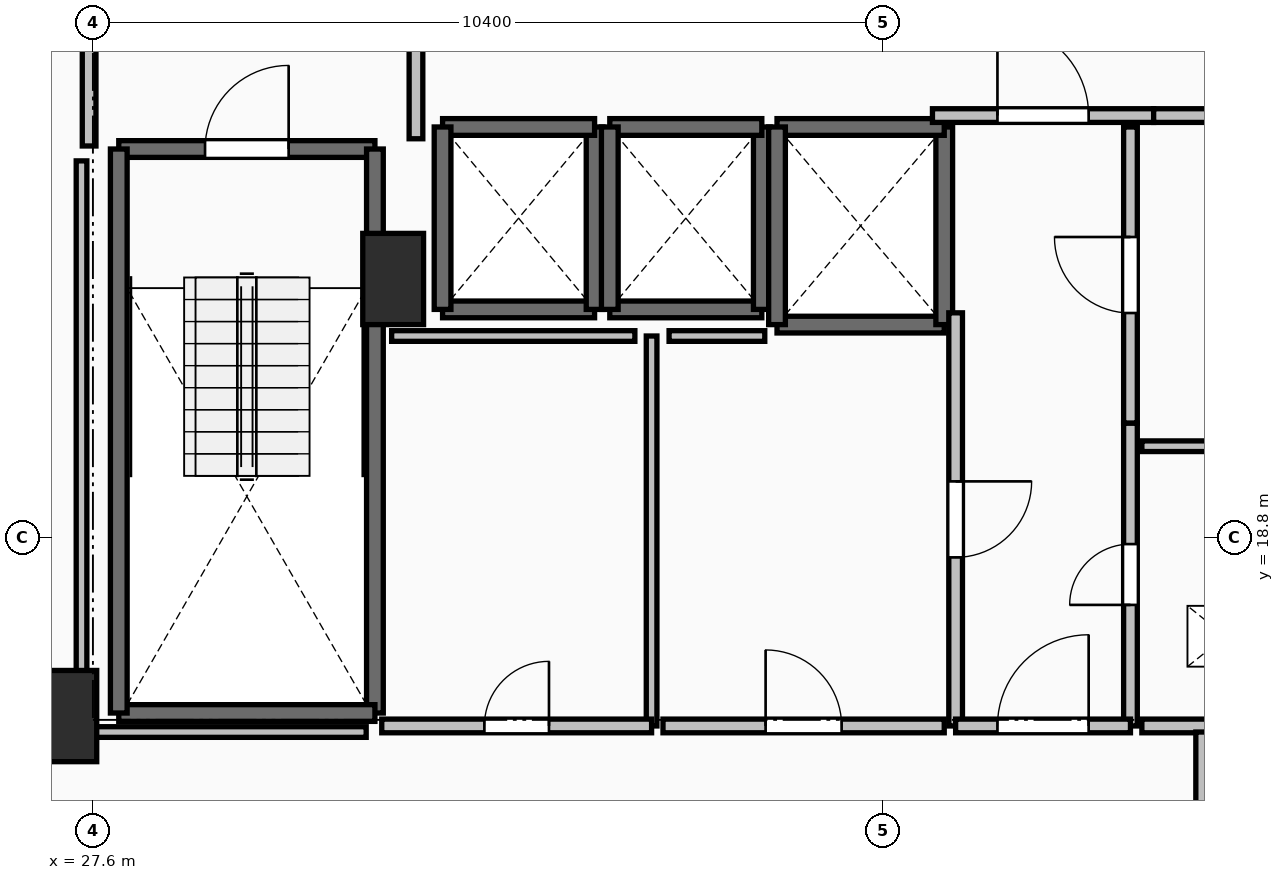
"""IFC4 building model, lengths in metres.
Left out: names, types, materials, properties, quantities, classifications, styles, units other than length and angle.
Written with IfcOpenShell. Run it as: python <this file> out.ifc"""

import sys

from ifc_helpers import new_model, si_unit, direction, frame, frame_2d, origin, origin_2d, place, context, subcontext, project, spatial, rectangle, extrude, element, fill, save


model = new_model("IFC4")
c1 = context("Model", 3, precision=1e-05, world=origin(), true_north=direction((0.0, 1.0)))
c2 = subcontext(c1, "Body", "Model", "MODEL_VIEW")
j1 = project(units=[si_unit("LENGTHUNIT", "METRE"), si_unit("PLANEANGLEUNIT", "RADIAN")], contexts=[c1])
p1 = place(None, origin())
s1 = spatial("IfcSite", under=j1, at=p1, CompositionType="ELEMENT")
p2 = place(p1, origin())
s2 = spatial("IfcBuilding", under=s1, at=p2, CompositionType="ELEMENT")
p3 = place(p2, frame((0.0, 0.0, 41.5)))
s3 = spatial("IfcBuildingStorey", under=s2, at=p3, CompositionType="ELEMENT", Elevation=41.5)
for number, where, z_axis, x_axis in (
    (1, (27.25, 16.45, 0.0), (0.0, 0.0, 1.0), (1.0, 0.0, 0.0)),
    (2, (31.55, 22.2, 0.0), (0.0, 0.0, 1.0), (1.0, 0.0, 0.0)),
):
    element("IfcColumn", number, at=place(p3, frame(where, z_axis=z_axis, x_axis=x_axis)), inside=s3, PredefinedType="PILASTER", context=c2, shape_type="SweptSolid", body=[
        extrude(rectangle(XDim=0.8, YDim=1.2, at=origin_2d()), origin(), (0.0, 0.0, 1.0), 3.5),
    ])
p4 = place(p3, frame((27.94, 23.91, 0.0), z_axis=(0.0, 0.0, 1.0), x_axis=(1.0, 0.0, 0.0)))
e3 = element("IfcWall", 3, at=p4, inside=s3, PredefinedType="SOLIDWALL", context=c2, shape_type="SweptSolid", body=[
    extrude(rectangle(XDim=3.37, YDim=0.22, at=frame_2d((1.685, 0.0))), origin(), (0.0, 0.0, 1.0), 3.24),
])
p5 = place(p4, frame((1.135, 0.0, 0.0)))
e4 = element("IfcOpeningElement", 4, at=p5, cuts=e3, PredefinedType="OPENING", context=c2, shape_type="SweptSolid", body=[
    extrude(rectangle(XDim=1.1, YDim=2.15, at=frame_2d((0.55, 1.075))), frame((0.0, 0.125, 0.0), z_axis=(0.0, -1.0, 0.0), x_axis=(1.0, 0.0, 0.0)), (0.0, 0.0, 1.0), 0.25),
])
p6 = place(p3, frame((31.31, 23.91, 0.0), z_axis=(0.0, 0.0, 1.0), x_axis=(0.0, -1.0, 0.0)))
e5 = element("IfcWall", 5, at=p6, inside=s3, PredefinedType="SOLIDWALL", context=c2, shape_type="SweptSolid", body=[
    extrude(rectangle(XDim=7.42, YDim=0.22, at=frame_2d((3.71, 0.0))), origin(), (0.0, 0.0, 1.0), 3.24),
])
p7 = place(p3, frame((31.31, 16.49, 0.0), z_axis=(0.0, 0.0, 1.0), x_axis=(-1.0, 0.0, 0.0)))
e6 = element("IfcWall", 6, at=p7, inside=s3, PredefinedType="SOLIDWALL", context=c2, shape_type="SweptSolid", body=[
    extrude(rectangle(XDim=3.37, YDim=0.22, at=frame_2d((1.685, 0.0))), origin(), (0.0, 0.0, 1.0), 3.24),
])
p8 = place(p3, frame((27.94, 16.49, 0.0), z_axis=(0.0, 0.0, 1.0), x_axis=(0.0, 1.0, 0.0)))
e7 = element("IfcWall", 7, at=p8, inside=s3, PredefinedType="SOLIDWALL", context=c2, shape_type="SweptSolid", body=[
    extrude(rectangle(XDim=7.42, YDim=0.22, at=frame_2d((3.71, 0.0))), origin(), (0.0, 0.0, 1.0), 3.24),
])
p9 = place(p3, frame((32.2, 21.8, 0.0), z_axis=(0.0, 0.0, 1.0), x_axis=(1.0, 0.0, 0.0)))
e8 = element("IfcWall", 8, at=p9, inside=s3, PredefinedType="SOLIDWALL", context=c2, shape_type="SweptSolid", body=[
    extrude(rectangle(XDim=2.0, YDim=0.22, at=frame_2d((1.0, 0.0))), origin(), (0.0, 0.0, 1.0), 3.24),
])
p10 = place(p3, frame((34.2, 21.8, 0.0), z_axis=(0.0, 0.0, 1.0), x_axis=(0.0, 1.0, 0.0)))
e9 = element("IfcWall", 9, at=p10, inside=s3, PredefinedType="SOLIDWALL", context=c2, shape_type="SweptSolid", body=[
    extrude(rectangle(XDim=2.4, YDim=0.22, at=frame_2d((1.2, 0.0))), origin(), (0.0, 0.0, 1.0), 3.24),
])
p11 = place(p3, frame((34.2, 24.2, 0.0), z_axis=(0.0, 0.0, 1.0), x_axis=(-1.0, 0.0, 0.0)))
e10 = element("IfcWall", 10, at=p11, inside=s3, PredefinedType="SOLIDWALL", context=c2, shape_type="SweptSolid", body=[
    extrude(rectangle(XDim=2.0, YDim=0.22, at=frame_2d((1.0, 0.0))), origin(), (0.0, 0.0, 1.0), 3.24),
])
p12 = place(p3, frame((32.2, 24.2, 0.0), z_axis=(0.0, 0.0, 1.0), x_axis=(0.0, -1.0, 0.0)))
e11 = element("IfcWall", 11, at=p12, inside=s3, PredefinedType="SOLIDWALL", context=c2, shape_type="SweptSolid", body=[
    extrude(rectangle(XDim=2.4, YDim=0.22, at=frame_2d((1.2, 0.0))), origin(), (0.0, 0.0, 1.0), 3.24),
])
p13 = place(p3, frame((34.4, 21.8, 0.0), z_axis=(0.0, 0.0, 1.0), x_axis=(1.0, 0.0, 0.0)))
e12 = element("IfcWall", 12, at=p13, inside=s3, PredefinedType="SOLIDWALL", context=c2, shape_type="SweptSolid", body=[
    extrude(rectangle(XDim=2.0, YDim=0.22, at=frame_2d((1.0, 0.0))), origin(), (0.0, 0.0, 1.0), 3.24),
])
p14 = place(p3, frame((36.4, 21.8, 0.0), z_axis=(0.0, 0.0, 1.0), x_axis=(0.0, 1.0, 0.0)))
e13 = element("IfcWall", 13, at=p14, inside=s3, PredefinedType="SOLIDWALL", context=c2, shape_type="SweptSolid", body=[
    extrude(rectangle(XDim=2.4, YDim=0.22, at=frame_2d((1.2, 0.0))), origin(), (0.0, 0.0, 1.0), 3.24),
])
p15 = place(p3, frame((36.4, 24.2, 0.0), z_axis=(0.0, 0.0, 1.0), x_axis=(-1.0, 0.0, 0.0)))
e14 = element("IfcWall", 14, at=p15, inside=s3, PredefinedType="SOLIDWALL", context=c2, shape_type="SweptSolid", body=[
    extrude(rectangle(XDim=2.0, YDim=0.22, at=frame_2d((1.0, 0.0))), origin(), (0.0, 0.0, 1.0), 3.24),
])
p16 = place(p3, frame((34.4, 24.2, 0.0), z_axis=(0.0, 0.0, 1.0), x_axis=(0.0, -1.0, 0.0)))
e15 = element("IfcWall", 15, at=p16, inside=s3, PredefinedType="SOLIDWALL", context=c2, shape_type="SweptSolid", body=[
    extrude(rectangle(XDim=2.4, YDim=0.22, at=frame_2d((1.2, 0.0))), origin(), (0.0, 0.0, 1.0), 3.24),
])
p17 = place(p3, frame((36.6, 21.6, 0.0), z_axis=(0.0, 0.0, 1.0), x_axis=(1.0, 0.0, 0.0)))
e16 = element("IfcWall", 16, at=p17, inside=s3, PredefinedType="SOLIDWALL", context=c2, shape_type="SweptSolid", body=[
    extrude(rectangle(XDim=2.2, YDim=0.22, at=frame_2d((1.1, 0.0))), origin(), (0.0, 0.0, 1.0), 3.24),
])
p18 = place(p3, frame((38.8, 21.6, 0.0), z_axis=(0.0, 0.0, 1.0), x_axis=(0.0, 1.0, 0.0)))
e17 = element("IfcWall", 17, at=p18, inside=s3, PredefinedType="SOLIDWALL", context=c2, shape_type="SweptSolid", body=[
    extrude(rectangle(XDim=2.6, YDim=0.22, at=frame_2d((1.3, 0.0))), origin(), (0.0, 0.0, 1.0), 3.24),
])
p19 = place(p3, frame((38.8, 24.2, 0.0), z_axis=(0.0, 0.0, 1.0), x_axis=(-1.0, 0.0, 0.0)))
e18 = element("IfcWall", 18, at=p19, inside=s3, PredefinedType="SOLIDWALL", context=c2, shape_type="SweptSolid", body=[
    extrude(rectangle(XDim=2.2, YDim=0.22, at=frame_2d((1.1, 0.0))), origin(), (0.0, 0.0, 1.0), 3.24),
])
p20 = place(p3, frame((36.6, 24.2, 0.0), z_axis=(0.0, 0.0, 1.0), x_axis=(0.0, -1.0, 0.0)))
e19 = element("IfcWall", 19, at=p20, inside=s3, PredefinedType="SOLIDWALL", context=c2, shape_type="SweptSolid", body=[
    extrude(rectangle(XDim=2.6, YDim=0.22, at=frame_2d((1.3, 0.0))), origin(), (0.0, 0.0, 1.0), 3.24),
])
p21 = place(p3, frame((31.85, 24.045, 0.0), z_axis=(0.0, 0.0, 1.0), x_axis=(0.0, 1.0, 0.0)))
e20 = element("IfcWall", 20, at=p21, inside=s3, PredefinedType="PARTITIONING", context=c2, shape_type="SweptSolid", body=[
    extrude(rectangle(XDim=3.91, YDim=0.18, at=frame_2d((1.955, 0.0))), origin(), (0.0, 0.0, 1.0), 3.24),
])
p22 = place(p21, frame((1.355, 0.0, 0.0)))
e21 = element("IfcOpeningElement", 21, at=p22, cuts=e20, PredefinedType="OPENING", context=c2, shape_type="SweptSolid", body=[
    extrude(rectangle(XDim=1.2, YDim=2.15, at=frame_2d((0.6, 1.075))), frame((0.0, 0.105, 0.0), z_axis=(0.0, -1.0, 0.0), x_axis=(1.0, 0.0, 0.0)), (0.0, 0.0, 1.0), 0.21),
])
p23 = place(p3, frame((27.55, 28.0, 0.0), z_axis=(0.0, 0.0, 1.0), x_axis=(0.0, -1.0, 0.0)))
e22 = element("IfcWall", 22, at=p23, inside=s3, PredefinedType="PARTITIONING", context=c2, shape_type="SweptSolid", body=[
    extrude(rectangle(XDim=4.05, YDim=0.18, at=frame_2d((2.025, 0.0))), origin(), (0.0, 0.0, 1.0), 3.24),
])
p24 = place(p23, frame((1.425, 0.0, 0.0)))
e23 = element("IfcOpeningElement", 23, at=p24, cuts=e22, PredefinedType="OPENING", context=c2, shape_type="SweptSolid", body=[
    extrude(rectangle(XDim=1.2, YDim=2.15, at=frame_2d((0.6, 1.075))), frame((0.0, 0.105, 0.0), z_axis=(0.0, -1.0, 0.0), x_axis=(1.0, 0.0, 0.0)), (0.0, 0.0, 1.0), 0.21),
])
p25 = place(p3, frame((38.645, 24.35, 0.0), z_axis=(0.0, 0.0, 1.0), x_axis=(1.0, 0.0, 0.0)))
e24 = element("IfcWall", 24, at=p25, inside=s3, PredefinedType="PARTITIONING", context=c2, shape_type="SweptSolid", body=[
    extrude(rectangle(XDim=2.91, YDim=0.18, at=frame_2d((1.455, 0.0))), origin(), (0.0, 0.0, 1.0), 3.24),
])
p26 = place(p25, frame((0.855, 0.0, 0.0)))
e25 = element("IfcOpeningElement", 25, at=p26, cuts=e24, PredefinedType="OPENING", context=c2, shape_type="SweptSolid", body=[
    extrude(rectangle(XDim=1.2, YDim=2.15, at=frame_2d((0.6, 1.075))), frame((0.0, 0.105, 0.0), z_axis=(0.0, -1.0, 0.0), x_axis=(1.0, 0.0, 0.0)), (0.0, 0.0, 1.0), 0.21),
])
p27 = place(p3, frame((41.555, 24.35, 0.0), z_axis=(0.0, 0.0, 1.0), x_axis=(1.0, 0.0, 0.0)))
e26 = element("IfcWall", 26, at=p27, inside=s3, PredefinedType="PARTITIONING", context=c2, shape_type="SweptSolid", body=[
    extrude(rectangle(XDim=2.445, YDim=0.18, at=frame_2d((1.223, 0.0))), origin(), (0.0, 0.0, 1.0), 3.24),
])
p28 = place(p27, frame((0.722, 0.0, 0.0)))
e27 = element("IfcOpeningElement", 27, at=p28, cuts=e26, PredefinedType="OPENING", context=c2, shape_type="SweptSolid", body=[
    extrude(rectangle(XDim=1.0, YDim=2.15, at=frame_2d((0.5, 1.075))), frame((0.0, 0.105, 0.0), z_axis=(0.0, -1.0, 0.0), x_axis=(1.0, 0.0, 0.0)), (0.0, 0.0, 1.0), 0.21),
])
p29 = place(p3, frame((41.25, 16.32, 0.0), z_axis=(0.0, 0.0, 1.0), x_axis=(0.0, 1.0, 0.0)))
e28 = element("IfcWall", 28, at=p29, inside=s3, PredefinedType="PARTITIONING", context=c2, shape_type="SweptSolid", body=[
    extrude(rectangle(XDim=3.985, YDim=0.18, at=frame_2d((1.992, 0.0))), origin(), (0.0, 0.0, 1.0), 3.24),
])
p30 = place(p29, frame((1.593, 0.0, 0.0)))
e29 = element("IfcOpeningElement", 29, at=p30, cuts=e28, PredefinedType="OPENING", context=c2, shape_type="SweptSolid", body=[
    extrude(rectangle(XDim=0.8, YDim=2.05, at=frame_2d((0.4, 1.025))), frame((0.0, 0.105, 0.0), z_axis=(0.0, -1.0, 0.0), x_axis=(1.0, 0.0, 0.0)), (0.0, 0.0, 1.0), 0.21),
])
p31 = place(p3, frame((41.25, 20.305, 0.0), z_axis=(0.0, 0.0, 1.0), x_axis=(0.0, 1.0, 0.0)))
e30 = element("IfcWall", 30, at=p31, inside=s3, PredefinedType="PARTITIONING", context=c2, shape_type="SweptSolid", body=[
    extrude(rectangle(XDim=3.895, YDim=0.18, at=frame_2d((1.948, 0.0))), origin(), (0.0, 0.0, 1.0), 3.24),
])
p32 = place(p31, frame((1.448, 0.0, 0.0)))
e31 = element("IfcOpeningElement", 31, at=p32, cuts=e30, PredefinedType="OPENING", context=c2, shape_type="SweptSolid", body=[
    extrude(rectangle(XDim=1.0, YDim=2.15, at=frame_2d((0.5, 1.075))), frame((0.0, 0.105, 0.0), z_axis=(0.0, -1.0, 0.0), x_axis=(1.0, 0.0, 0.0)), (0.0, 0.0, 1.0), 0.21),
])
p33 = place(p3, frame((38.95, 21.755, 0.0), z_axis=(0.0, 0.0, 1.0), x_axis=(0.0, -1.0, 0.0)))
e32 = element("IfcWall", 32, at=p33, inside=s3, PredefinedType="PARTITIONING", context=c2, shape_type="SweptSolid", body=[
    extrude(rectangle(XDim=5.435, YDim=0.18, at=frame_2d((2.717, 0.0))), origin(), (0.0, 0.0, 1.0), 3.24),
])
p34 = place(p33, frame((2.218, 0.0, 0.0)))
e33 = element("IfcOpeningElement", 33, at=p34, cuts=e32, PredefinedType="OPENING", context=c2, shape_type="SweptSolid", body=[
    extrude(rectangle(XDim=1.0, YDim=2.15, at=frame_2d((0.5, 1.075))), frame((0.0, 0.105, 0.0), z_axis=(0.0, -1.0, 0.0), x_axis=(1.0, 0.0, 0.0)), (0.0, 0.0, 1.0), 0.21),
])
p35 = place(p3, frame((38.95, 16.32, 0.0), z_axis=(0.0, 0.0, 1.0), x_axis=(1.0, 0.0, 0.0)))
e34 = element("IfcWall", 34, at=p35, inside=s3, PredefinedType="PARTITIONING", context=c2, shape_type="SweptSolid", body=[
    extrude(rectangle(XDim=2.3, YDim=0.18, at=frame_2d((1.15, 0.0))), origin(), (0.0, 0.0, 1.0), 3.24),
])
p36 = place(p35, frame((0.55, 0.0, 0.0)))
e35 = element("IfcOpeningElement", 35, at=p36, cuts=e34, PredefinedType="OPENING", context=c2, shape_type="SweptSolid", body=[
    extrude(rectangle(XDim=1.2, YDim=2.15, at=frame_2d((0.6, 1.075))), frame((0.0, 0.105, 0.0), z_axis=(0.0, -1.0, 0.0), x_axis=(1.0, 0.0, 0.0)), (0.0, 0.0, 1.0), 0.21),
])
p37 = place(p3, frame((44.6, 20.0, 0.0), z_axis=(0.0, 0.0, 1.0), x_axis=(-1.0, 0.0, 0.0)))
e36 = element("IfcWall", 36, at=p37, inside=s3, PredefinedType="PARTITIONING", context=c2, shape_type="SweptSolid", body=[
    extrude(rectangle(XDim=3.2, YDim=0.14, at=frame_2d((1.6, 0.0))), origin(), (0.0, 0.0, 1.0), 3.24),
])
p38 = place(p3, frame((41.4, 16.32, 0.0), z_axis=(0.0, 0.0, 1.0), x_axis=(1.0, 0.0, 0.0)))
e37 = element("IfcWall", 37, at=p38, inside=s3, PredefinedType="PARTITIONING", context=c2, shape_type="SweptSolid", body=[
    extrude(rectangle(XDim=3.2, YDim=0.18, at=frame_2d((1.6, 0.0))), origin(), (0.0, 0.0, 1.0), 3.24),
])
p39 = place(p38, frame((1.2, 0.0, 0.0)))
e38 = element("IfcOpeningElement", 38, at=p39, cuts=e37, PredefinedType="OPENING", context=c2, shape_type="SweptSolid", body=[
    extrude(rectangle(XDim=0.8, YDim=2.05, at=frame_2d((0.4, 1.025))), frame((0.0, 0.105, 0.0), z_axis=(0.0, -1.0, 0.0), x_axis=(1.0, 0.0, 0.0)), (0.0, 0.0, 1.0), 0.21),
])
p40 = place(p3, frame((34.95, 16.32, 0.0), z_axis=(0.0, 0.0, 1.0), x_axis=(0.0, 1.0, 0.0)))
e39 = element("IfcWall", 39, at=p40, inside=s3, PredefinedType="PARTITIONING", context=c2, shape_type="SweptSolid", body=[
    extrude(rectangle(XDim=5.13, YDim=0.14, at=frame_2d((2.565, 0.0))), origin(), (0.0, 0.0, 1.0), 3.24),
])
p41 = place(p3, frame((31.4, 16.32, 0.0), z_axis=(0.0, 0.0, 1.0), x_axis=(1.0, 0.0, 0.0)))
e40 = element("IfcWall", 40, at=p41, inside=s3, PredefinedType="PARTITIONING", context=c2, shape_type="SweptSolid", body=[
    extrude(rectangle(XDim=3.55, YDim=0.18, at=frame_2d((1.775, 0.0))), origin(), (0.0, 0.0, 1.0), 3.24),
])
p42 = place(p41, frame((1.35, 0.0, 0.0)))
e41 = element("IfcOpeningElement", 41, at=p42, cuts=e40, PredefinedType="OPENING", context=c2, shape_type="SweptSolid", body=[
    extrude(rectangle(XDim=0.85, YDim=2.1, at=frame_2d((0.425, 1.05))), frame((0.0, 0.105, 0.0), z_axis=(0.0, -1.0, 0.0), x_axis=(1.0, 0.0, 0.0)), (0.0, 0.0, 1.0), 0.21),
])
p43 = place(p3, frame((35.1, 16.32, 0.0), z_axis=(0.0, 0.0, 1.0), x_axis=(1.0, 0.0, 0.0)))
e42 = element("IfcWall", 42, at=p43, inside=s3, PredefinedType="PARTITIONING", context=c2, shape_type="SweptSolid", body=[
    extrude(rectangle(XDim=3.7, YDim=0.18, at=frame_2d((1.85, 0.0))), origin(), (0.0, 0.0, 1.0), 3.24),
])
p44 = place(p43, frame((1.35, 0.0, 0.0)))
e43 = element("IfcOpeningElement", 43, at=p44, cuts=e42, PredefinedType="OPENING", context=c2, shape_type="SweptSolid", body=[
    extrude(rectangle(XDim=1.0, YDim=2.15, at=frame_2d((0.5, 1.075))), frame((0.0, 0.105, 0.0), z_axis=(0.0, -1.0, 0.0), x_axis=(1.0, 0.0, 0.0)), (0.0, 0.0, 1.0), 0.21),
])
p45 = place(p3, frame((42.2, 14.1, 0.0), z_axis=(0.0, 0.0, 1.0), x_axis=(0.0, 1.0, 0.0)))
e44 = element("IfcWall", 44, at=p45, inside=s3, PredefinedType="PARTITIONING", context=c2, shape_type="SweptSolid", body=[
    extrude(rectangle(XDim=2.14, YDim=0.18, at=frame_2d((1.07, 0.0))), origin(), (0.0, 0.0, 1.0), 3.24),
])
p46 = place(p3, frame((34.73, 21.45, 0.0), z_axis=(0.0, 0.0, 1.0), x_axis=(-1.0, 0.0, 0.0)))
e45 = element("IfcWall", 45, at=p46, inside=s3, PredefinedType="PARTITIONING", context=c2, shape_type="SweptSolid", body=[
    extrude(rectangle(XDim=3.2, YDim=0.14, at=frame_2d((1.6, 0.0))), origin(), (0.0, 0.0, 1.0), 3.24),
])
p47 = place(p3, frame((36.439, 21.45, 0.0), z_axis=(0.0, 0.0, 1.0), x_axis=(-1.0, 0.0, 0.0)))
e46 = element("IfcWall", 46, at=p47, inside=s3, PredefinedType="PARTITIONING", context=c2, shape_type="SweptSolid", body=[
    extrude(rectangle(XDim=1.259, YDim=0.14, at=frame_2d((0.629, 0.0))), origin(), (0.0, 0.0, 1.0), 3.24),
])
p48 = place(p3, frame((31.195, 16.24, 0.0), z_axis=(0.0, 0.0, 1.0), x_axis=(-1.0, 0.0, 0.0)))
e47 = element("IfcWall", 47, at=p48, inside=s3, PredefinedType="PARTITIONING", context=c2, shape_type="SweptSolid", body=[
    extrude(rectangle(XDim=3.745, YDim=0.14, at=frame_2d((1.873, 0.0))), origin(), (0.0, 0.0, 1.0), 2.432),
])
p49 = place(p3, frame((27.45, 16.24, 0.0), z_axis=(0.0, 0.0, 1.0), x_axis=(0.0, 1.0, 0.0)))
e48 = element("IfcWall", 48, at=p49, inside=s3, PredefinedType="PARTITIONING", context=c2, shape_type="SweptSolid", body=[
    extrude(rectangle(XDim=7.514, YDim=0.14, at=frame_2d((3.757, 0.0))), origin(), (0.0, 0.0, 1.0), 2.432),
])
p50 = place(p5, origin())
e49 = element("IfcDoor", 49, at=p50, inside=s3, OperationType="SINGLE_SWING_RIGHT", PredefinedType="DOOR", context=c2, shape_type="SweptSolid", body=[
    extrude(rectangle(XDim=1.1, YDim=2.15, at=frame_2d((0.55, 1.075))), frame((0.0, 0.025, 0.0), z_axis=(0.0, -1.0, 0.0), x_axis=(1.0, 0.0, 0.0)), (0.0, 0.0, 1.0), 0.05),
])
fill(e4, e49)
p51 = place(p26, origin())
e50 = element("IfcDoor", 50, at=p51, inside=s3, OperationType="SINGLE_SWING_LEFT", PredefinedType="DOOR", context=c2, shape_type="SweptSolid", body=[
    extrude(rectangle(XDim=1.2, YDim=2.15, at=frame_2d((0.6, 1.075))), frame((0.0, 0.025, 0.0), z_axis=(0.0, -1.0, 0.0), x_axis=(1.0, 0.0, 0.0)), (0.0, 0.0, 1.0), 0.05),
])
fill(e25, e50)
p52 = place(p30, origin())
e51 = element("IfcDoor", 51, at=p52, inside=s3, OperationType="SINGLE_SWING_LEFT", PredefinedType="DOOR", context=c2, shape_type="SweptSolid", body=[
    extrude(rectangle(XDim=0.8, YDim=2.05, at=frame_2d((0.4, 1.025))), frame((0.0, 0.025, 0.0), z_axis=(0.0, -1.0, 0.0), x_axis=(1.0, 0.0, 0.0)), (0.0, 0.0, 1.0), 0.05),
])
fill(e29, e51)
p53 = place(p32, origin())
e52 = element("IfcDoor", 52, at=p53, inside=s3, OperationType="SINGLE_SWING_RIGHT", PredefinedType="DOOR", context=c2, shape_type="SweptSolid", body=[
    extrude(rectangle(XDim=1.0, YDim=2.15, at=frame_2d((0.5, 1.075))), frame((0.0, 0.025, 0.0), z_axis=(0.0, -1.0, 0.0), x_axis=(1.0, 0.0, 0.0)), (0.0, 0.0, 1.0), 0.05),
])
fill(e31, e52)
p54 = place(p34, origin())
e53 = element("IfcDoor", 53, at=p54, inside=s3, OperationType="SINGLE_SWING_LEFT", PredefinedType="DOOR", context=c2, shape_type="SweptSolid", body=[
    extrude(rectangle(XDim=1.0, YDim=2.15, at=frame_2d((0.5, 1.075))), frame((0.0, 0.025, 0.0), z_axis=(0.0, -1.0, 0.0), x_axis=(1.0, 0.0, 0.0)), (0.0, 0.0, 1.0), 0.05),
])
fill(e33, e53)
p55 = place(p36, origin())
e54 = element("IfcDoor", 54, at=p55, inside=s3, OperationType="SINGLE_SWING_RIGHT", PredefinedType="DOOR", context=c2, shape_type="SweptSolid", body=[
    extrude(rectangle(XDim=1.2, YDim=2.15, at=frame_2d((0.6, 1.075))), frame((0.0, 0.025, 0.0), z_axis=(0.0, -1.0, 0.0), x_axis=(1.0, 0.0, 0.0)), (0.0, 0.0, 1.0), 0.05),
])
fill(e35, e54)
p56 = place(p42, origin())
e55 = element("IfcDoor", 55, at=p56, inside=s3, OperationType="SINGLE_SWING_RIGHT", PredefinedType="DOOR", context=c2, shape_type="SweptSolid", body=[
    extrude(rectangle(XDim=0.85, YDim=2.1, at=frame_2d((0.425, 1.05))), frame((0.0, 0.025, 0.0), z_axis=(0.0, -1.0, 0.0), x_axis=(1.0, 0.0, 0.0)), (0.0, 0.0, 1.0), 0.05),
])
fill(e41, e55)
p57 = place(p44, origin())
e56 = element("IfcDoor", 56, at=p57, inside=s3, OperationType="SINGLE_SWING_LEFT", PredefinedType="DOOR", context=c2, shape_type="SweptSolid", body=[
    extrude(rectangle(XDim=1.0, YDim=2.15, at=frame_2d((0.5, 1.075))), frame((0.0, 0.025, 0.0), z_axis=(0.0, -1.0, 0.0), x_axis=(1.0, 0.0, 0.0)), (0.0, 0.0, 1.0), 0.05),
])
fill(e43, e56)
save(model, sys.argv[1])
